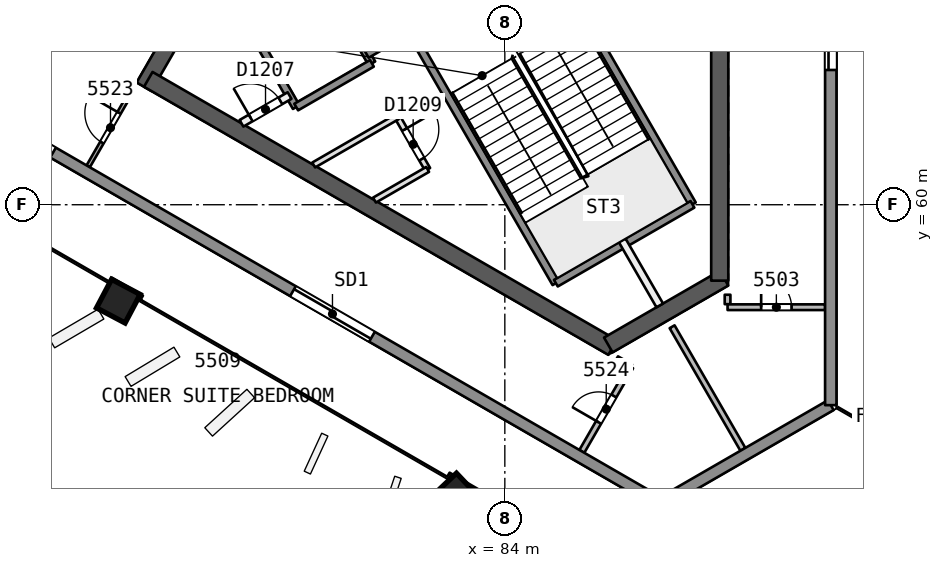
"""IFC4 building model, lengths in metres.
Left out: names, types, materials, properties, quantities, classifications, styles, units other than length and angle.
Written with IfcOpenShell. Run it as: python <this file> out.ifc"""

import sys

from ifc_helpers import new_model, si_unit, direction, frame, frame_2d, origin, origin_2d, place, context, subcontext, project, spatial, rectangle, extrude, element, fill, save


model = new_model("IFC4")
c1 = context("Model", 3, precision=1e-05, world=origin(), true_north=direction((0.0, 1.0)))
c2 = subcontext(c1, "Body", "Model", "MODEL_VIEW")
j1 = project(units=[si_unit("LENGTHUNIT", "METRE"), si_unit("PLANEANGLEUNIT", "RADIAN")], contexts=[c1])
p1 = place(None, origin())
s1 = spatial("IfcSite", under=j1, at=p1, CompositionType="ELEMENT")
p2 = place(p1, origin())
s2 = spatial("IfcBuilding", under=s1, at=p2, CompositionType="ELEMENT")
p3 = place(p2, frame((0.0, 0.0, 224.3)))
s3 = spatial("IfcBuildingStorey", under=s2, at=p3, CompositionType="ELEMENT", Elevation=224.3)
p4 = place(p3, frame((79.63, 71.981, 0.0), z_axis=(0.0, 0.0, 1.0), x_axis=(-0.500002171595, -0.86602415001, 0.0)))
e1 = element("IfcWall", 1, at=p4, inside=s3, PredefinedType="SHEAR", context=c2, shape_type="SweptSolid", body=[
    extrude(rectangle(XDim=10.25, YDim=0.45, at=frame_2d((5.125, 0.0))), origin(), (0.0, 0.0, 1.0), 3.7),
])
p5 = place(p4, frame((0.82, 0.0, 0.0)))
e2 = element("IfcOpeningElement", 2, at=p5, cuts=e1, PredefinedType="OPENING", context=c2, shape_type="SweptSolid", body=[
    extrude(rectangle(XDim=1.2, YDim=2.1, at=frame_2d((0.6, 1.05))), frame((0.0, 0.235, 0.0), z_axis=(0.0, -1.0, 0.0), x_axis=(1.0, 0.0, 0.0)), (0.0, 0.0, 1.0), 0.471),
])
p6 = place(p3, frame((74.617, 63.299, 0.0), z_axis=(0.0, 0.0, 1.0), x_axis=(0.86602594008, -0.499999071108, 0.0)))
e3 = element("IfcWall", 3, at=p6, inside=s3, PredefinedType="SHEAR", context=c2, shape_type="SweptSolid", body=[
    extrude(rectangle(XDim=14.108, YDim=0.45, at=frame_2d((7.054, 0.0))), origin(), (0.0, 0.0, 1.0), 3.7),
])
p7 = place(p3, frame((86.723, 56.31, 0.0), z_axis=(0.0, 0.0, 1.0), x_axis=(0.866042179588, 0.49997094233, 0.0)))
e4 = element("IfcWall", 4, at=p7, inside=s3, PredefinedType="SHEAR", context=c2, shape_type="SweptSolid", body=[
    extrude(rectangle(XDim=3.515, YDim=0.45, at=frame_2d((1.758, 0.0))), origin(), (0.0, 0.0, 1.0), 3.7),
])
p8 = place(p3, frame((89.655, 58.002, 0.0), z_axis=(0.0, 0.0, 1.0), x_axis=(0.0, 1.0, 0.0)))
e5 = element("IfcWall", 5, at=p8, inside=s3, PredefinedType="SHEAR", context=c2, shape_type="SweptSolid", body=[
    extrude(rectangle(XDim=14.204, YDim=0.45, at=frame_2d((7.102, 0.0))), origin(), (0.0, 0.0, 1.0), 3.7),
])
p9 = place(p3, frame((73.829, 57.435, 0.0), z_axis=(0.000857578916, 0.022824792675, 0.999739112668), x_axis=(-0.499938956565, -0.865825126557, 0.020196285069)))
e6 = element("IfcColumn", 6, at=p9, inside=s3, PredefinedType="COLUMN", context=c2, shape_type="SweptSolid", body=[
    extrude(rectangle(XDim=0.85, YDim=0.85, at=origin_2d()), origin(), (0.0, 0.0, 1.0), 3.701),
])
p10 = place(p3, frame((82.721, 52.301, 0.0), z_axis=(-0.008376454378, 0.028163354484, 0.999568237028), x_axis=(-0.500232049542, -0.86565577712, 0.020198320458)))
e7 = element("IfcColumn", 7, at=p10, inside=s3, PredefinedType="COLUMN", context=c2, shape_type="SweptSolid", body=[
    extrude(rectangle(XDim=0.85, YDim=0.85, at=origin_2d()), origin(), (0.0, 0.0, 1.0), 3.702),
])
p11 = place(p3, frame((91.613, 51.225, 0.0), z_axis=(-0.017541078386, 0.030532027415, 0.999379860649), x_axis=(0.497845433655, -0.866550650603, 0.035212130424)))
e8 = element("IfcColumn", 8, at=p11, inside=s3, PredefinedType="COLUMN", context=c2, shape_type="SweptSolid", body=[
    extrude(rectangle(XDim=1.9, YDim=1.9, at=origin_2d()), origin(), (0.0, 0.0, 1.0), 3.702),
])
p12 = place(p3, frame((89.861, 57.632, 0.0), z_axis=(0.0, 0.0, 1.0), x_axis=(0.0, -1.0, 0.0)))
e9 = element("IfcWall", 9, at=p12, inside=s3, PredefinedType="PARTITIONING", context=c2, shape_type="SweptSolid", body=[
    extrude(rectangle(XDim=0.248, YDim=0.15, at=frame_2d((0.124, 0.0))), origin(), (0.0, 0.0, 1.0), 3.3),
])
p13 = place(p3, frame((89.861, 57.304, 0.0), z_axis=(0.0, 0.0, 1.0), x_axis=(1.0, 0.0, 0.0)))
e10 = element("IfcWall", 10, at=p13, inside=s3, PredefinedType="PARTITIONING", context=c2, shape_type="SweptSolid", body=[
    extrude(rectangle(XDim=2.567, YDim=0.15, at=frame_2d((1.284, 0.0))), origin(), (0.0, 0.0, 1.0), 3.3),
])
p14 = place(p13, frame((0.884, 0.0, 0.0)))
e11 = element("IfcOpeningElement", 11, at=p14, cuts=e10, PredefinedType="OPENING", context=c2, shape_type="SweptSolid", body=[
    extrude(rectangle(XDim=0.8, YDim=2.1, at=frame_2d((0.4, 1.05))), frame((0.0, 0.085, 0.0), z_axis=(0.0, -1.0, 0.0), x_axis=(1.0, 0.0, 0.0)), (0.0, 0.0, 1.0), 0.171),
])
p15 = place(p3, frame((88.402, 56.789, 0.0), z_axis=(0.0, 0.0, 1.0), x_axis=(0.499966389646, -0.866044807862, 0.0)))
e12 = element("IfcWall", 12, at=p15, inside=s3, PredefinedType="PARTITIONING", context=c2, shape_type="SweptSolid", body=[
    extrude(rectangle(XDim=3.725, YDim=0.15, at=frame_2d((1.863, 0.0))), origin(), (0.0, 0.0, 1.0), 3.3),
])
p16 = place(p3, frame((69.256, 63.192, 0.0), z_axis=(0.0, 0.0, 1.0), x_axis=(0.499993230995, 0.866029311836, 0.0)))
e13 = element("IfcWall", 13, at=p16, inside=s3, PredefinedType="PARTITIONING", context=c2, shape_type="SweptSolid", body=[
    extrude(rectangle(XDim=10.328, YDim=0.2, at=frame_2d((5.164, 0.0))), origin(), (0.0, 0.0, 1.0), 3.3),
])
p17 = place(p3, frame((73.036, 61.01, 0.0), z_axis=(0.0, 0.0, 1.0), x_axis=(0.499950341091, 0.86605407247, 0.0)))
e14 = element("IfcWall", 14, at=p17, inside=s3, PredefinedType="PARTITIONING", context=c2, shape_type="SweptSolid", body=[
    extrude(rectangle(XDim=2.349, YDim=0.1, at=frame_2d((1.175, 0.0))), origin(), (0.0, 0.0, 1.0), 3.3),
])
p18 = place(p17, frame((0.725, 0.0, 0.0)))
e15 = element("IfcOpeningElement", 15, at=p18, cuts=e14, PredefinedType="OPENING", context=c2, shape_type="SweptSolid", body=[
    extrude(rectangle(XDim=0.9, YDim=2.1, at=frame_2d((0.45, 1.05))), frame((0.0, 0.061, 0.0), z_axis=(0.0, -1.0, 0.0), x_axis=(1.0, 0.0, 0.0)), (0.0, 0.0, 1.0), 0.121),
])
p19 = place(p3, frame((86.026, 53.51, 0.0), z_axis=(0.0, 0.0, 1.0), x_axis=(0.50000507078, 0.866022476149, 0.0)))
e16 = element("IfcWall", 16, at=p19, inside=s3, PredefinedType="PARTITIONING", context=c2, shape_type="SweptSolid", body=[
    extrude(rectangle(XDim=2.567, YDim=0.15, at=frame_2d((1.284, 0.0))), origin(), (0.0, 0.0, 1.0), 3.3),
])
p20 = place(p19, frame((0.884, 0.0, 0.0)))
e17 = element("IfcOpeningElement", 17, at=p20, cuts=e16, PredefinedType="OPENING", context=c2, shape_type="SweptSolid", body=[
    extrude(rectangle(XDim=0.8, YDim=2.1, at=frame_2d((0.4, 1.05))), frame((0.0, 0.085, 0.0), z_axis=(0.0, -1.0, 0.0), x_axis=(1.0, 0.0, 0.0)), (0.0, 0.0, 1.0), 0.171),
])
p21 = place(p3, frame((87.31, 55.733, 0.0), z_axis=(0.0, 0.0, 1.0), x_axis=(-0.8659754619, 0.500086491905, 0.0)))
e18 = element("IfcWall", 18, at=p21, inside=s3, PredefinedType="PARTITIONING", context=c2, shape_type="SweptSolid", body=[
    extrude(rectangle(XDim=0.426, YDim=0.15, at=frame_2d((0.213, 0.0))), origin(), (0.0, 0.0, 1.0), 3.3),
])
p22 = place(p3, frame((92.577, 54.726, 0.0), z_axis=(0.0, 0.0, 1.0), x_axis=(-0.866032272612, -0.499988102653, 0.0)))
e19 = element("IfcWall", 19, at=p22, inside=s3, PredefinedType="SOLIDWALL", context=c2, shape_type="SweptSolid", body=[
    extrude(rectangle(XDim=5.171, YDim=0.3, at=frame_2d((2.585, 0.0))), origin(), (0.0, 0.0, 1.0), 3.3),
])
p23 = place(p3, frame((92.577, 105.274, 0.0), z_axis=(0.0, 0.0, 1.0), x_axis=(0.0, -1.0, 0.0)))
e20 = element("IfcWall", 20, at=p23, inside=s3, PredefinedType="SOLIDWALL", context=c2, shape_type="SweptSolid", body=[
    extrude(rectangle(XDim=50.547, YDim=0.3, at=frame_2d((25.274, 0.0))), origin(), (0.0, 0.0, 1.0), 3.3),
])
p24 = place(p23, frame((29.218, 0.0, 0.0)))
e21 = element("IfcOpeningElement", 21, at=p24, cuts=e20, PredefinedType="OPENING", context=c2, shape_type="SweptSolid", body=[
    extrude(rectangle(XDim=2.4, YDim=2.4, at=frame_2d((1.2, 1.2))), frame((0.0, 0.161, 0.0), z_axis=(0.0, -1.0, 0.0), x_axis=(1.0, 0.0, 0.0)), (0.0, 0.0, 1.0), 0.321),
])
p25 = place(p23, frame((39.328, 0.0, 0.0)))
e22 = element("IfcOpeningElement", 22, at=p25, cuts=e20, PredefinedType="OPENING", context=c2, shape_type="SweptSolid", body=[
    extrude(rectangle(XDim=2.4, YDim=2.4, at=frame_2d((1.2, 1.2))), frame((0.0, 0.161, 0.0), z_axis=(0.0, -1.0, 0.0), x_axis=(1.0, 0.0, 0.0)), (0.0, 0.0, 1.0), 0.321),
])
p26 = place(p23, frame((18.774, 0.0, 0.0)))
e23 = element("IfcOpeningElement", 23, at=p26, cuts=e20, PredefinedType="OPENING", context=c2, shape_type="SweptSolid", body=[
    extrude(rectangle(XDim=2.4, YDim=2.4, at=frame_2d((1.2, 1.2))), frame((0.0, 0.161, 0.0), z_axis=(0.0, -1.0, 0.0), x_axis=(1.0, 0.0, 0.0)), (0.0, 0.0, 1.0), 0.321),
])
p27 = place(p23, frame((8.771, 0.0, 0.0)))
e24 = element("IfcOpeningElement", 24, at=p27, cuts=e20, PredefinedType="OPENING", context=c2, shape_type="SweptSolid", body=[
    extrude(rectangle(XDim=2.4, YDim=2.4, at=frame_2d((1.2, 1.2))), frame((0.0, 0.161, 0.0), z_axis=(0.0, -1.0, 0.0), x_axis=(1.0, 0.0, 0.0)), (0.0, 0.0, 1.0), 0.321),
])
p28 = place(p23, frame((23.918, 0.0, 0.0)))
e25 = element("IfcOpeningElement", 25, at=p28, cuts=e20, PredefinedType="OPENING", context=c2, shape_type="SweptSolid", body=[
    extrude(rectangle(XDim=2.4, YDim=2.4, at=frame_2d((1.2, 1.2))), frame((0.0, 0.161, 0.0), z_axis=(0.0, -1.0, 0.0), x_axis=(1.0, 0.0, 0.0)), (0.0, 0.0, 1.0), 0.321),
])
p29 = place(p3, frame((88.099, 52.141, 0.0), z_axis=(0.0, 0.0, 1.0), x_axis=(-0.86602584856, 0.499999229625, 0.0)))
e26 = element("IfcWall", 26, at=p29, inside=s3, PredefinedType="SOLIDWALL", context=c2, shape_type="SweptSolid", body=[
    extrude(rectangle(XDim=50.547, YDim=0.3, at=frame_2d((25.274, 0.0))), origin(), (0.0, 0.0, 1.0), 3.3),
])
p30 = place(p29, frame((23.294, 0.0, 0.0)))
e27 = element("IfcOpeningElement", 27, at=p30, cuts=e26, PredefinedType="OPENING", context=c2, shape_type="SweptSolid", body=[
    extrude(rectangle(XDim=2.4, YDim=2.4, at=frame_2d((1.2, 1.2))), frame((0.0, 0.161, 0.0), z_axis=(0.0, -1.0, 0.0), x_axis=(1.0, 0.0, 0.0)), (0.0, 0.0, 1.0), 0.321),
])
p31 = place(p29, frame((28.906, 0.0, 0.0)))
e28 = element("IfcOpeningElement", 28, at=p31, cuts=e26, PredefinedType="OPENING", context=c2, shape_type="SweptSolid", body=[
    extrude(rectangle(XDim=2.4, YDim=2.4, at=frame_2d((1.2, 1.2))), frame((0.0, 0.161, 0.0), z_axis=(0.0, -1.0, 0.0), x_axis=(1.0, 0.0, 0.0)), (0.0, 0.0, 1.0), 0.321),
])
p32 = place(p29, frame((39.328, 0.0, 0.0)))
e29 = element("IfcOpeningElement", 29, at=p32, cuts=e26, PredefinedType="OPENING", context=c2, shape_type="SweptSolid", body=[
    extrude(rectangle(XDim=2.4, YDim=2.4, at=frame_2d((1.2, 1.2))), frame((0.0, 0.161, 0.0), z_axis=(0.0, -1.0, 0.0), x_axis=(1.0, 0.0, 0.0)), (0.0, 0.0, 1.0), 0.321),
])
p33 = place(p29, frame((18.462, 0.0, 0.0)))
e30 = element("IfcOpeningElement", 30, at=p33, cuts=e26, PredefinedType="OPENING", context=c2, shape_type="SweptSolid", body=[
    extrude(rectangle(XDim=2.4, YDim=2.4, at=frame_2d((1.2, 1.2))), frame((0.0, 0.161, 0.0), z_axis=(0.0, -1.0, 0.0), x_axis=(1.0, 0.0, 0.0)), (0.0, 0.0, 1.0), 0.321),
])
p34 = place(p29, frame((8.771, 0.0, 0.0)))
e31 = element("IfcOpeningElement", 31, at=p34, cuts=e26, PredefinedType="OPENING", context=c2, shape_type="SweptSolid", body=[
    extrude(rectangle(XDim=2.4, YDim=2.4, at=frame_2d((1.2, 1.2))), frame((0.0, 0.161, 0.0), z_axis=(0.0, -1.0, 0.0), x_axis=(1.0, 0.0, 0.0)), (0.0, 0.0, 1.0), 0.321),
])
p35 = place(p3, frame((77.135, 64.952, 0.0), z_axis=(0.0, 0.0, 1.0), x_axis=(0.499996545922, -0.866027397988, 0.0)))
e32 = element("IfcWall", 32, at=p35, inside=s3, PredefinedType="SOLIDWALL", context=c2, shape_type="SweptSolid", body=[
    extrude(rectangle(XDim=2.75, YDim=0.2, at=frame_2d((1.375, 0.0))), origin(), (0.0, 0.0, 1.0), 3.3),
])
p36 = place(p3, frame((81.169, 62.315, 0.0), z_axis=(0.0, 0.0, 1.0), x_axis=(0.499995408039, -0.866028054938, 0.0)))
e33 = element("IfcWall", 33, at=p36, inside=s3, PredefinedType="PARTITIONING", context=c2, shape_type="SweptSolid", body=[
    extrude(rectangle(XDim=1.6, YDim=0.15, at=frame_2d((0.8, 0.0))), origin(), (0.0, 0.0, 1.0), 3.3),
])
p37 = place(p36, frame((0.387, 0.0, 0.0)))
e34 = element("IfcOpeningElement", 34, at=p37, cuts=e33, PredefinedType="OPENING", context=c2, shape_type="SweptSolid", body=[
    extrude(rectangle(XDim=0.9, YDim=2.1, at=frame_2d((0.45, 1.05))), frame((0.0, 0.085, 0.0), z_axis=(0.0, -1.0, 0.0), x_axis=(1.0, 0.0, 0.0)), (0.0, 0.0, 1.0), 0.171),
])
p38 = place(p3, frame((79.127, 66.102, 0.0), z_axis=(0.0, 0.0, 1.0), x_axis=(0.499996545922, -0.866027397988, 0.0)))
e35 = element("IfcWall", 35, at=p38, inside=s3, PredefinedType="SOLIDWALL", context=c2, shape_type="SweptSolid", body=[
    extrude(rectangle(XDim=2.75, YDim=0.2, at=frame_2d((1.375, 0.0))), origin(), (0.0, 0.0, 1.0), 3.3),
])
p39 = place(p3, frame((81.493, 64.604, 0.0), z_axis=(0.0, 0.0, 1.0), x_axis=(0.500006057782, -0.866021906294, 0.0)))
e36 = element("IfcWall", 36, at=p39, inside=s3, PredefinedType="SOLIDWALL", context=c2, shape_type="SweptSolid", body=[
    extrude(rectangle(XDim=7.7, YDim=0.2, at=frame_2d((3.85, 0.0))), origin(), (0.0, 0.0, 1.0), 3.3),
])
p40 = place(p3, frame((87.09, 59.06, 0.0), z_axis=(0.0, 0.0, 1.0), x_axis=(0.500011643316, -0.866018681408, 0.0)))
e37 = element("IfcWall", 37, at=p40, inside=s3, PredefinedType="PARTITIONING", context=c2, shape_type="SweptSolid", body=[
    extrude(rectangle(XDim=1.973, YDim=0.2, at=frame_2d((0.987, 0.0))), origin(), (0.0, 0.0, 1.0), 3.3),
])
p41 = place(p3, frame((85.087, 66.679, 0.0), z_axis=(0.0, 0.0, 1.0), x_axis=(0.500019787375, -0.866013979237, 0.0)))
e38 = element("IfcWall", 38, at=p41, inside=s3, PredefinedType="SOLIDWALL", context=c2, shape_type="SweptSolid", body=[
    extrude(rectangle(XDim=7.7, YDim=0.2, at=frame_2d((3.85, 0.0))), origin(), (0.0, 0.0, 1.0), 3.3),
])
p42 = place(p41, frame((0.55, 0.0, 0.0)))
e39 = element("IfcOpeningElement", 39, at=p42, cuts=e38, PredefinedType="OPENING", context=c2, shape_type="SweptSolid", body=[
    extrude(rectangle(XDim=1.1, YDim=2.1, at=frame_2d((0.55, 1.05))), frame((0.0, 0.11, 0.0), z_axis=(0.0, -1.0, 0.0), x_axis=(1.0, 0.0, 0.0)), (0.0, 0.0, 1.0), 0.221),
])
p43 = place(p3, frame((77.07, 62.143, 0.0), z_axis=(0.0, 0.0, 1.0), x_axis=(0.866013036001, 0.500021421018, 0.0)))
e40 = element("IfcWall", 40, at=p43, inside=s3, PredefinedType="PARTITIONING", context=c2, shape_type="SweptSolid", body=[
    extrude(rectangle(XDim=1.461, YDim=0.2, at=frame_2d((0.73, 0.0))), origin(), (0.0, 0.0, 1.0), 3.3),
])
p44 = place(p43, frame((0.281, 0.0, 0.0)))
e41 = element("IfcOpeningElement", 41, at=p44, cuts=e40, PredefinedType="OPENING", context=c2, shape_type="SweptSolid", body=[
    extrude(rectangle(XDim=0.9, YDim=2.1, at=frame_2d((0.45, 1.05))), frame((0.0, 0.11, 0.0), z_axis=(0.0, -1.0, 0.0), x_axis=(1.0, 0.0, 0.0)), (0.0, 0.0, 1.0), 0.221),
])
p45 = place(p3, frame((80.367, 63.954, 0.0), z_axis=(0.0, 0.0, 1.0), x_axis=(0.866026575979, 0.499997969693, 0.0)))
e42 = element("IfcWall", 42, at=p45, inside=s3, PredefinedType="SOLIDWALL", context=c2, shape_type="SweptSolid", body=[
    extrude(rectangle(XDim=6.75, YDim=0.2, at=frame_2d((3.375, 0.0))), origin(), (0.0, 0.0, 1.0), 3.3),
])
p46 = place(p3, frame((78.51, 62.57, 0.0), z_axis=(0.0, 0.0, 1.0), x_axis=(0.866053019151, 0.499952165731, 0.0)))
e43 = element("IfcWall", 43, at=p46, inside=s3, PredefinedType="SOLIDWALL", context=c2, shape_type="SweptSolid", body=[
    extrude(rectangle(XDim=2.3, YDim=0.2, at=frame_2d((1.15, 0.0))), origin(), (0.0, 0.0, 1.0), 3.3),
])
p47 = place(p3, frame((78.97, 61.046, 0.0), z_axis=(0.0, 0.0, 1.0), x_axis=(0.866033475577, 0.499986018985, 0.0)))
e44 = element("IfcWall", 44, at=p47, inside=s3, PredefinedType="PARTITIONING", context=c2, shape_type="SweptSolid", body=[
    extrude(rectangle(XDim=2.539, YDim=0.15, at=frame_2d((1.27, 0.0))), origin(), (0.0, 0.0, 1.0), 3.3),
])
p48 = place(p3, frame((80.57, 60.122, 0.0), z_axis=(0.0, 0.0, 1.0), x_axis=(0.866039608017, 0.49997539674, 0.0)))
e45 = element("IfcWall", 45, at=p48, inside=s3, PredefinedType="PARTITIONING", context=c2, shape_type="SweptSolid", body=[
    extrude(rectangle(XDim=1.615, YDim=0.15, at=frame_2d((0.808, 0.0))), origin(), (0.0, 0.0, 1.0), 3.3),
])
p49 = place(p3, frame((85.343, 57.935, 0.0), z_axis=(0.0, 0.0, 1.0), x_axis=(0.866004344652, 0.500036473714, 0.0)))
e46 = element("IfcWall", 46, at=p49, inside=s3, PredefinedType="SOLIDWALL", context=c2, shape_type="SweptSolid", body=[
    extrude(rectangle(XDim=4.15, YDim=0.2, at=frame_2d((2.075, 0.0))), origin(), (0.0, 0.0, 1.0), 3.3),
])
p50 = place(p14, origin())
e47 = element("IfcDoor", 47, at=p50, inside=s3, OperationType="SINGLE_SWING_LEFT", PredefinedType="NOTDEFINED", context=c2, shape_type="SweptSolid", body=[
    extrude(rectangle(XDim=0.8, YDim=2.1, at=frame_2d((0.4, 1.05))), frame((0.0, 0.025, 0.0), z_axis=(0.0, -1.0, 0.0), x_axis=(1.0, 0.0, 0.0)), (0.0, 0.0, 1.0), 0.05),
])
fill(e11, e47)
p51 = place(p18, origin())
e48 = element("IfcDoor", 48, at=p51, inside=s3, OperationType="SINGLE_SWING_RIGHT", PredefinedType="NOTDEFINED", context=c2, shape_type="SweptSolid", body=[
    extrude(rectangle(XDim=0.9, YDim=2.1, at=frame_2d((0.45, 1.05))), frame((0.0, 0.025, 0.0), z_axis=(0.0, -1.0, 0.0), x_axis=(1.0, 0.0, 0.0)), (0.0, 0.0, 1.0), 0.05),
])
fill(e15, e48)
p52 = place(p20, origin())
e49 = element("IfcDoor", 49, at=p52, inside=s3, OperationType="SINGLE_SWING_LEFT", PredefinedType="NOTDEFINED", context=c2, shape_type="SweptSolid", body=[
    extrude(rectangle(XDim=0.8, YDim=2.1, at=frame_2d((0.4, 1.05))), frame((0.0, 0.025, 0.0), z_axis=(0.0, -1.0, 0.0), x_axis=(1.0, 0.0, 0.0)), (0.0, 0.0, 1.0), 0.05),
])
fill(e17, e49)
p53 = place(p25, origin())
e50 = element("IfcDoor", 50, at=p53, inside=s3, OperationType="SLIDING_TO_RIGHT", PredefinedType="NOTDEFINED", context=c2, shape_type="SweptSolid", body=[
    extrude(rectangle(XDim=2.4, YDim=2.4, at=frame_2d((1.2, 1.2))), frame((0.0, 0.025, 0.0), z_axis=(0.0, -1.0, 0.0), x_axis=(1.0, 0.0, 0.0)), (0.0, 0.0, 1.0), 0.05),
])
fill(e22, e50)
p54 = place(p33, origin())
e51 = element("IfcDoor", 51, at=p54, inside=s3, OperationType="SLIDING_TO_RIGHT", PredefinedType="NOTDEFINED", context=c2, shape_type="SweptSolid", body=[
    extrude(rectangle(XDim=2.4, YDim=2.4, at=frame_2d((1.2, 1.2))), frame((0.0, 0.025, 0.0), z_axis=(0.0, -1.0, 0.0), x_axis=(1.0, 0.0, 0.0)), (0.0, 0.0, 1.0), 0.05),
])
fill(e30, e51)
p55 = place(p34, origin())
e52 = element("IfcDoor", 52, at=p55, inside=s3, OperationType="SLIDING_TO_LEFT", PredefinedType="NOTDEFINED", context=c2, shape_type="SweptSolid", body=[
    extrude(rectangle(XDim=2.4, YDim=2.4, at=frame_2d((1.2, 1.2))), frame((0.0, 0.025, 0.0), z_axis=(0.0, -1.0, 0.0), x_axis=(1.0, 0.0, 0.0)), (0.0, 0.0, 1.0), 0.05),
])
fill(e31, e52)
p56 = place(p44, origin())
e53 = element("IfcDoor", 53, at=p56, inside=s3, OperationType="SINGLE_SWING_LEFT", PredefinedType="NOTDEFINED", context=c2, shape_type="SweptSolid", body=[
    extrude(rectangle(XDim=0.9, YDim=2.1, at=frame_2d((0.45, 1.05))), frame((0.0, 0.025, 0.0), z_axis=(0.0, -1.0, 0.0), x_axis=(1.0, 0.0, 0.0)), (0.0, 0.0, 1.0), 0.05),
])
fill(e41, e53)
p57 = place(p37, origin())
e54 = element("IfcDoor", 54, at=p57, inside=s3, OperationType="SINGLE_SWING_LEFT", PredefinedType="NOTDEFINED", context=c2, shape_type="SweptSolid", body=[
    extrude(rectangle(XDim=0.9, YDim=2.1, at=frame_2d((0.45, 1.05))), frame((0.0, 0.025, 0.0), z_axis=(0.0, -1.0, 0.0), x_axis=(1.0, 0.0, 0.0)), (0.0, 0.0, 1.0), 0.05),
])
fill(e34, e54)
save(model, sys.argv[1])
